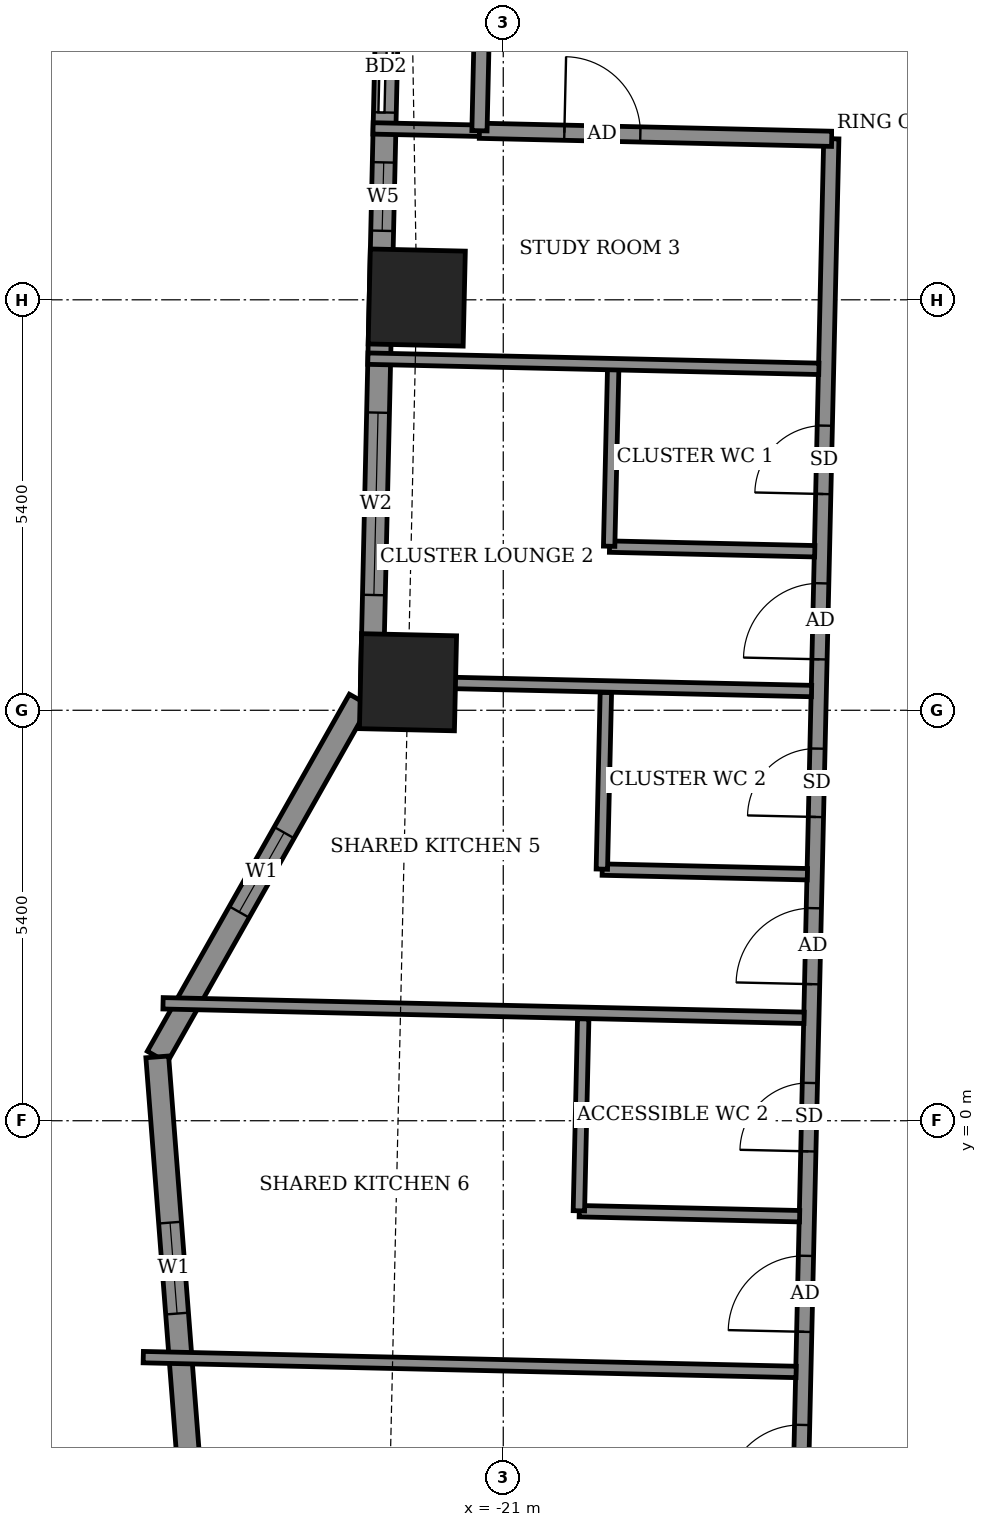
"""IFC4 building model, lengths in metres.
Left out: names, types, materials, properties, quantities, classifications, styles, units other than length and angle.
Written with IfcOpenShell. Run it as: python <this file> out.ifc"""

import sys

from ifc_helpers import new_model, si_unit, direction, frame, frame_2d, origin, origin_2d, place, context, subcontext, project, spatial, rectangle, extrude, element, fill, save


model = new_model("IFC4")
c1 = context("Model", 3, precision=1e-05, world=origin(), true_north=direction((0.0, 1.0)))
c2 = subcontext(c1, "Body", "Model", "MODEL_VIEW")
j1 = project(units=[si_unit("LENGTHUNIT", "METRE"), si_unit("PLANEANGLEUNIT", "RADIAN")], contexts=[c1])
p1 = place(None, origin())
s1 = spatial("IfcSite", under=j1, at=p1, CompositionType="ELEMENT")
p2 = place(p1, origin())
s2 = spatial("IfcBuilding", under=s1, at=p2, CompositionType="ELEMENT")
p3 = place(p2, frame((0.0, 0.0, 163.5)))
s3 = spatial("IfcBuildingStorey", under=s2, at=p3, CompositionType="ELEMENT", Elevation=163.5)
for number, where, z_axis, x_axis in (
    (1, (-22.138, 10.83, -0.55), (0.0, 0.0, 1.0), (-0.023, -1.0, 0.0)),
    (2, (-22.253, 5.769, -0.55), (0.0, 0.0, 1.0), (-0.023, -1.0, 0.0)),
):
    element("IfcColumn", number, at=place(p3, frame(where, z_axis=z_axis, x_axis=x_axis)), inside=s3, PredefinedType="COLUMN", context=c2, shape_type="SweptSolid", body=[
        extrude(rectangle(XDim=1.25, YDim=1.25, at=origin_2d()), origin(), (0.0, 0.0, 1.0), 3.6),
    ])
p4 = place(p3, frame((-22.501, 15.751, 0.0), z_axis=(0.0, 0.0, 1.0), x_axis=(-0.022737995473, -0.999741458359, 0.0)))
e3 = element("IfcWall", 3, at=p4, inside=s3, PredefinedType="SOLIDWALL", context=c2, shape_type="SweptSolid", body=[
    extrude(rectangle(XDim=10.029, YDim=0.3, at=frame_2d((5.014, 0.0))), origin(), (0.0, 0.0, 1.0), 3.05),
])
p5 = place(p4, frame((1.287, 0.0, 0.0)))
e4 = element("IfcOpeningElement", 4, at=p5, cuts=e3, PredefinedType="OPENING", context=c2, shape_type="SweptSolid", body=[
    extrude(rectangle(XDim=1.2, YDim=2.4, at=frame_2d((0.6, 1.2))), frame((0.0, 0.16, 0.0), z_axis=(0.0, -1.0, 0.0), x_axis=(1.0, 0.0, 0.0)), (0.0, 0.0, 1.0), 0.32),
])
p6 = place(p4, frame((3.144, 0.0, 0.9)))
e5 = element("IfcOpeningElement", 5, at=p6, cuts=e3, PredefinedType="OPENING", context=c2, shape_type="SweptSolid", body=[
    extrude(rectangle(XDim=0.9, YDim=1.5, at=frame_2d((0.45, 0.75))), frame((0.0, 0.16, 0.0), z_axis=(0.0, -1.0, 0.0), x_axis=(1.0, 0.0, 0.0)), (0.0, 0.0, 1.0), 0.32),
])
p7 = place(p4, frame((6.437, 0.0, 0.9)))
e6 = element("IfcOpeningElement", 6, at=p7, cuts=e3, PredefinedType="OPENING", context=c2, shape_type="SweptSolid", body=[
    extrude(rectangle(XDim=2.4, YDim=1.5, at=frame_2d((1.2, 0.75))), frame((0.0, 0.16, 0.0), z_axis=(0.0, -1.0, 0.0), x_axis=(1.0, 0.0, 0.0)), (0.0, 0.0, 1.0), 0.32),
])
p8 = place(p3, frame((-22.894, 5.537, 0.0), z_axis=(0.0, 0.0, 1.0), x_axis=(-0.492495436053, -0.870315026566, 0.0)))
e7 = element("IfcWall", 7, at=p8, inside=s3, PredefinedType="SOLIDWALL", context=c2, shape_type="SweptSolid", body=[
    extrude(rectangle(XDim=5.397, YDim=0.3, at=frame_2d((2.698, 0.0))), origin(), (0.0, 0.0, 1.0), 3.05),
])
p9 = place(p8, frame((2.007, 0.0, 0.9)))
e8 = element("IfcOpeningElement", 8, at=p9, cuts=e7, PredefinedType="OPENING", context=c2, shape_type="SweptSolid", body=[
    extrude(rectangle(XDim=1.2, YDim=1.5, at=frame_2d((0.6, 0.75))), frame((0.0, 0.16, 0.0), z_axis=(0.0, -1.0, 0.0), x_axis=(1.0, 0.0, 0.0)), (0.0, 0.0, 1.0), 0.32),
])
p10 = place(p3, frame((-25.552, 0.84, 0.0), z_axis=(0.0, 0.0, 1.0), x_axis=(0.076961115238, -0.997034095075, 0.0)))
e9 = element("IfcWall", 9, at=p10, inside=s3, PredefinedType="SOLIDWALL", context=c2, shape_type="SweptSolid", body=[
    extrude(rectangle(XDim=5.574, YDim=0.3, at=frame_2d((2.787, 0.0))), origin(), (0.0, 0.0, 1.0), 3.05),
])
p11 = place(p10, frame((2.187, 0.0, 0.9)))
e10 = element("IfcOpeningElement", 10, at=p11, cuts=e9, PredefinedType="OPENING", context=c2, shape_type="SweptSolid", body=[
    extrude(rectangle(XDim=1.2, YDim=1.5, at=frame_2d((0.6, 0.75))), frame((0.0, 0.16, 0.0), z_axis=(0.0, -1.0, 0.0), x_axis=(1.0, 0.0, 0.0)), (0.0, 0.0, 1.0), 0.32),
])
p12 = place(p3, frame((-17.32, -15.098, 0.0), z_axis=(0.0, 0.0, 1.0), x_axis=(0.022694293906, 0.999742451346, 0.0)))
e11 = element("IfcWall", 11, at=p12, inside=s3, PredefinedType="PARTITIONING", context=c2, shape_type="SweptSolid", body=[
    extrude(rectangle(XDim=28.024, YDim=0.2, at=frame_2d((14.012, 0.0))), origin(), (0.0, 0.0, 1.0), 3.05),
])
p13 = place(p12, frame((21.174, 0.0, 0.0)))
e12 = element("IfcOpeningElement", 12, at=p13, cuts=e11, PredefinedType="OPENING", context=c2, shape_type="SweptSolid", body=[
    extrude(rectangle(XDim=1.0, YDim=2.1, at=frame_2d((0.5, 1.05))), frame((0.0, 0.11, 0.0), z_axis=(0.0, -1.0, 0.0), x_axis=(1.0, 0.0, 0.0)), (0.0, 0.0, 1.0), 0.22),
])
p14 = place(p12, frame((23.349, 0.0, 0.0)))
e13 = element("IfcOpeningElement", 13, at=p14, cuts=e11, PredefinedType="OPENING", context=c2, shape_type="SweptSolid", body=[
    extrude(rectangle(XDim=0.9, YDim=2.1, at=frame_2d((0.45, 1.05))), frame((0.0, 0.11, 0.0), z_axis=(0.0, -1.0, 0.0), x_axis=(1.0, 0.0, 0.0)), (0.0, 0.0, 1.0), 0.22),
])
p15 = place(p12, frame((16.899, 0.0, 0.0)))
e14 = element("IfcOpeningElement", 14, at=p15, cuts=e11, PredefinedType="OPENING", context=c2, shape_type="SweptSolid", body=[
    extrude(rectangle(XDim=1.0, YDim=2.1, at=frame_2d((0.5, 1.05))), frame((0.0, 0.11, 0.0), z_axis=(0.0, -1.0, 0.0), x_axis=(1.0, 0.0, 0.0)), (0.0, 0.0, 1.0), 0.22),
])
p16 = place(p12, frame((19.099, 0.0, 0.0)))
e15 = element("IfcOpeningElement", 15, at=p16, cuts=e11, PredefinedType="OPENING", context=c2, shape_type="SweptSolid", body=[
    extrude(rectangle(XDim=0.9, YDim=2.1, at=frame_2d((0.45, 1.05))), frame((0.0, 0.11, 0.0), z_axis=(0.0, -1.0, 0.0), x_axis=(1.0, 0.0, 0.0)), (0.0, 0.0, 1.0), 0.22),
])
p17 = place(p12, frame((12.324, 0.0, 0.0)))
e16 = element("IfcOpeningElement", 16, at=p17, cuts=e11, PredefinedType="OPENING", context=c2, shape_type="SweptSolid", body=[
    extrude(rectangle(XDim=1.0, YDim=2.1, at=frame_2d((0.5, 1.05))), frame((0.0, 0.11, 0.0), z_axis=(0.0, -1.0, 0.0), x_axis=(1.0, 0.0, 0.0)), (0.0, 0.0, 1.0), 0.22),
])
p18 = place(p12, frame((14.699, 0.0, 0.0)))
e17 = element("IfcOpeningElement", 17, at=p18, cuts=e11, PredefinedType="OPENING", context=c2, shape_type="SweptSolid", body=[
    extrude(rectangle(XDim=0.9, YDim=2.1, at=frame_2d((0.45, 1.05))), frame((0.0, 0.11, 0.0), z_axis=(0.0, -1.0, 0.0), x_axis=(1.0, 0.0, 0.0)), (0.0, 0.0, 1.0), 0.22),
])
p19 = place(p12, frame((10.099, 0.0, 0.0)))
e18 = element("IfcOpeningElement", 18, at=p19, cuts=e11, PredefinedType="OPENING", context=c2, shape_type="SweptSolid", body=[
    extrude(rectangle(XDim=1.0, YDim=2.1, at=frame_2d((0.5, 1.05))), frame((0.0, 0.11, 0.0), z_axis=(0.0, -1.0, 0.0), x_axis=(1.0, 0.0, 0.0)), (0.0, 0.0, 1.0), 0.22),
])
p20 = place(p12, frame((7.749, 0.0, 0.0)))
e19 = element("IfcOpeningElement", 19, at=p20, cuts=e11, PredefinedType="OPENING", context=c2, shape_type="SweptSolid", body=[
    extrude(rectangle(XDim=0.9, YDim=2.1, at=frame_2d((0.45, 1.05))), frame((0.0, 0.11, 0.0), z_axis=(0.0, -1.0, 0.0), x_axis=(1.0, 0.0, 0.0)), (0.0, 0.0, 1.0), 0.22),
])
p21 = place(p12, frame((4.95, 0.0, 0.0)))
e20 = element("IfcOpeningElement", 20, at=p21, cuts=e11, PredefinedType="OPENING", context=c2, shape_type="SweptSolid", body=[
    extrude(rectangle(XDim=1.0, YDim=2.1, at=frame_2d((0.5, 1.05))), frame((0.0, 0.11, 0.0), z_axis=(0.0, -1.0, 0.0), x_axis=(1.0, 0.0, 0.0)), (0.0, 0.0, 1.0), 0.22),
])
p22 = place(p3, frame((-25.736, -3.11, 0.0), z_axis=(0.0, 0.0, 1.0), x_axis=(0.99974284683, -0.02267686512, 0.0)))
e21 = element("IfcWall", 21, at=p22, inside=s3, PredefinedType="PARTITIONING", context=c2, shape_type="SweptSolid", body=[
    extrude(rectangle(XDim=8.591, YDim=0.15, at=frame_2d((4.296, 0.0))), origin(), (0.0, 0.0, 1.0), 2.05),
])
p23 = place(p3, frame((-20.0, -1.19, 0.0), z_axis=(0.0, 0.0, 1.0), x_axis=(0.999739657619, -0.022817032779, 0.0)))
e22 = element("IfcWall", 22, at=p23, inside=s3, PredefinedType="PARTITIONING", context=c2, shape_type="SweptSolid", body=[
    extrude(rectangle(XDim=2.9, YDim=0.15, at=frame_2d((1.45, 0.0))), origin(), (0.0, 0.0, 1.0), 3.05),
])
p24 = place(p3, frame((-20.005, -1.185, 0.0), z_axis=(0.0, 0.0, 1.0), x_axis=(0.022521599255, 0.999746356616, 0.0)))
e23 = element("IfcWall", 23, at=p24, inside=s3, PredefinedType="PARTITIONING", context=c2, shape_type="SweptSolid", body=[
    extrude(rectangle(XDim=2.526, YDim=0.15, at=frame_2d((1.263, 0.0))), origin(), (0.0, 0.0, 1.0), 3.05),
])
p25 = place(p3, frame((-25.476, 1.545, 0.0), z_axis=(0.0, 0.0, 1.0), x_axis=(0.9997438932, -0.022630687329, 0.0)))
e24 = element("IfcWall", 24, at=p25, inside=s3, PredefinedType="PARTITIONING", context=c2, shape_type="SweptSolid", body=[
    extrude(rectangle(XDim=8.436, YDim=0.15, at=frame_2d((4.218, 0.0))), origin(), (0.0, 0.0, 1.0), 2.05),
])
p26 = place(p3, frame((-19.698, 3.304, 0.0), z_axis=(0.0, 0.0, 1.0), x_axis=(0.999744396973, -0.02260842146, 0.0)))
e25 = element("IfcWall", 25, at=p26, inside=s3, PredefinedType="PARTITIONING", context=c2, shape_type="SweptSolid", body=[
    extrude(rectangle(XDim=2.7, YDim=0.15, at=frame_2d((1.35, 0.0))), origin(), (0.0, 0.0, 1.0), 3.05),
])
p27 = place(p3, frame((-19.703, 3.31, 0.0), z_axis=(0.0, 0.0, 1.0), x_axis=(0.02279059109, 0.999740260747, 0.0)))
e26 = element("IfcWall", 26, at=p27, inside=s3, PredefinedType="PARTITIONING", context=c2, shape_type="SweptSolid", body=[
    extrude(rectangle(XDim=2.324, YDim=0.15, at=frame_2d((1.162, 0.0))), origin(), (0.0, 0.0, 1.0), 3.05),
])
p28 = place(p3, frame((-22.578, 5.78, 0.0), z_axis=(0.0, 0.0, 1.0), x_axis=(0.999746200787, -0.022528515532, 0.0)))
e27 = element("IfcWall", 27, at=p28, inside=s3, PredefinedType="PARTITIONING", context=c2, shape_type="SweptSolid", body=[
    extrude(rectangle(XDim=5.635, YDim=0.15, at=frame_2d((2.818, 0.0))), origin(), (0.0, 0.0, 1.0), 3.05),
])
p29 = place(p3, frame((-19.602, 7.553, 0.0), z_axis=(0.0, 0.0, 1.0), x_axis=(0.99974458177, -0.022600248254, 0.0)))
e28 = element("IfcWall", 28, at=p29, inside=s3, PredefinedType="PARTITIONING", context=c2, shape_type="SweptSolid", body=[
    extrude(rectangle(XDim=2.701, YDim=0.15, at=frame_2d((1.35, 0.0))), origin(), (0.0, 0.0, 1.0), 3.05),
])
p30 = place(p3, frame((-19.607, 7.558, 0.0), z_axis=(0.0, 0.0, 1.0), x_axis=(0.022781023197, 0.999740478815, 0.0)))
e29 = element("IfcWall", 29, at=p30, inside=s3, PredefinedType="PARTITIONING", context=c2, shape_type="SweptSolid", body=[
    extrude(rectangle(XDim=2.325, YDim=0.15, at=frame_2d((1.163, 0.0))), origin(), (0.0, 0.0, 1.0), 3.05),
])
p31 = place(p3, frame((-22.781, 10.026, 0.0), z_axis=(0.0, 0.0, 1.0), x_axis=(0.999745855039, -0.022543853533, 0.0)))
e30 = element("IfcWall", 30, at=p31, inside=s3, PredefinedType="PARTITIONING", context=c2, shape_type="SweptSolid", body=[
    extrude(rectangle(XDim=5.935, YDim=0.15, at=frame_2d((2.967, 0.0))), origin(), (0.0, 0.0, 1.0), 2.55),
])
p32 = place(p3, frame((-22.713, 13.055, 0.0), z_axis=(0.0, 0.0, 1.0), x_axis=(0.999756172383, -0.022081571112, 0.0)))
e31 = element("IfcWall", 31, at=p32, inside=s3, PredefinedType="PARTITIONING", context=c2, shape_type="SweptSolid", body=[
    extrude(rectangle(XDim=1.404, YDim=0.15, at=frame_2d((0.702, 0.0))), origin(), (0.0, 0.0, 1.0), 2.55),
])
p33 = place(p3, frame((-21.313, 13.024, 0.0), z_axis=(0.0, 0.0, 1.0), x_axis=(0.999738699021, -0.022858995594, 0.0)))
e32 = element("IfcWall", 32, at=p33, inside=s3, PredefinedType="PARTITIONING", context=c2, shape_type="SweptSolid", body=[
    extrude(rectangle(XDim=4.635, YDim=0.2, at=frame_2d((2.318, 0.0))), origin(), (0.0, 0.0, 1.0), 3.05),
])
p34 = place(p33, frame((1.117, 0.0, 0.0)))
e33 = element("IfcOpeningElement", 33, at=p34, cuts=e32, PredefinedType="OPENING", context=c2, shape_type="SweptSolid", body=[
    extrude(rectangle(XDim=1.0, YDim=2.1, at=frame_2d((0.5, 1.05))), frame((0.0, 0.11, 0.0), z_axis=(0.0, -1.0, 0.0), x_axis=(1.0, 0.0, 0.0)), (0.0, 0.0, 1.0), 0.22),
])
p35 = place(p3, frame((-21.313, 13.024, 0.0), z_axis=(0.0, 0.0, 1.0), x_axis=(0.022632637625, 0.99974384905, 0.0)))
e34 = element("IfcWall", 34, at=p35, inside=s3, PredefinedType="PARTITIONING", context=c2, shape_type="SweptSolid", body=[
    extrude(rectangle(XDim=1.5, YDim=0.2, at=frame_2d((0.75, 0.0))), origin(), (0.0, 0.0, 1.0), 3.05),
])
p36 = place(p3, frame((-21.279, 14.523, 0.0), z_axis=(0.0, 0.0, 1.0), x_axis=(0.999742669174, -0.02268469602, 0.0)))
e35 = element("IfcWall", 35, at=p36, inside=s3, PredefinedType="PARTITIONING", context=c2, shape_type="SweptSolid", body=[
    extrude(rectangle(XDim=40.639, YDim=0.2, at=frame_2d((20.319, 0.0))), origin(), (0.0, 0.0, 1.0), 3.05),
])
p37 = place(p36, frame((38.275, 0.0, 0.0)))
e36 = element("IfcOpeningElement", 36, at=p37, cuts=e35, PredefinedType="OPENING", context=c2, shape_type="SweptSolid", body=[
    extrude(rectangle(XDim=0.9, YDim=2.1, at=frame_2d((0.45, 1.05))), frame((0.0, 0.11, 0.0), z_axis=(0.0, -1.0, 0.0), x_axis=(1.0, 0.0, 0.0)), (0.0, 0.0, 1.0), 0.22),
])
p38 = place(p36, frame((31.475, 0.0, 0.0)))
e37 = element("IfcOpeningElement", 37, at=p38, cuts=e35, PredefinedType="OPENING", context=c2, shape_type="SweptSolid", body=[
    extrude(rectangle(XDim=0.9, YDim=2.1, at=frame_2d((0.45, 1.05))), frame((0.0, 0.11, 0.0), z_axis=(0.0, -1.0, 0.0), x_axis=(1.0, 0.0, 0.0)), (0.0, 0.0, 1.0), 0.22),
])
p39 = place(p36, frame((29.35, 0.0, 0.0)))
e38 = element("IfcOpeningElement", 38, at=p39, cuts=e35, PredefinedType="OPENING", context=c2, shape_type="SweptSolid", body=[
    extrude(rectangle(XDim=0.9, YDim=2.1, at=frame_2d((0.45, 1.05))), frame((0.0, 0.11, 0.0), z_axis=(0.0, -1.0, 0.0), x_axis=(1.0, 0.0, 0.0)), (0.0, 0.0, 1.0), 0.22),
])
p40 = place(p36, frame((22.45, 0.0, 0.0)))
e39 = element("IfcOpeningElement", 39, at=p40, cuts=e35, PredefinedType="OPENING", context=c2, shape_type="SweptSolid", body=[
    extrude(rectangle(XDim=0.9, YDim=2.1, at=frame_2d((0.45, 1.05))), frame((0.0, 0.11, 0.0), z_axis=(0.0, -1.0, 0.0), x_axis=(1.0, 0.0, 0.0)), (0.0, 0.0, 1.0), 0.22),
])
p41 = place(p36, frame((20.425, 0.0, 0.0)))
e40 = element("IfcOpeningElement", 40, at=p41, cuts=e35, PredefinedType="OPENING", context=c2, shape_type="SweptSolid", body=[
    extrude(rectangle(XDim=0.9, YDim=2.1, at=frame_2d((0.45, 1.05))), frame((0.0, 0.11, 0.0), z_axis=(0.0, -1.0, 0.0), x_axis=(1.0, 0.0, 0.0)), (0.0, 0.0, 1.0), 0.22),
])
p42 = place(p36, frame((13.575, 0.0, 0.0)))
e41 = element("IfcOpeningElement", 41, at=p42, cuts=e35, PredefinedType="OPENING", context=c2, shape_type="SweptSolid", body=[
    extrude(rectangle(XDim=0.9, YDim=2.1, at=frame_2d((0.45, 1.05))), frame((0.0, 0.11, 0.0), z_axis=(0.0, -1.0, 0.0), x_axis=(1.0, 0.0, 0.0)), (0.0, 0.0, 1.0), 0.22),
])
p43 = place(p36, frame((11.4, 0.0, 0.0)))
e42 = element("IfcOpeningElement", 42, at=p43, cuts=e35, PredefinedType="OPENING", context=c2, shape_type="SweptSolid", body=[
    extrude(rectangle(XDim=0.9, YDim=2.1, at=frame_2d((0.45, 1.05))), frame((0.0, 0.11, 0.0), z_axis=(0.0, -1.0, 0.0), x_axis=(1.0, 0.0, 0.0)), (0.0, 0.0, 1.0), 0.22),
])
p44 = place(p36, frame((1.575, 0.0, 0.0)))
e43 = element("IfcOpeningElement", 43, at=p44, cuts=e35, PredefinedType="OPENING", context=c2, shape_type="SweptSolid", body=[
    extrude(rectangle(XDim=1.0, YDim=2.1, at=frame_2d((0.5, 1.05))), frame((0.0, 0.11, 0.0), z_axis=(0.0, -1.0, 0.0), x_axis=(1.0, 0.0, 0.0)), (0.0, 0.0, 1.0), 0.22),
])
p45 = place(p36, frame((6.6, 0.0, 0.0)))
e44 = element("IfcOpeningElement", 44, at=p45, cuts=e35, PredefinedType="OPENING", context=c2, shape_type="SweptSolid", body=[
    extrude(rectangle(XDim=0.9, YDim=2.1, at=frame_2d((0.45, 1.05))), frame((0.0, 0.11, 0.0), z_axis=(0.0, -1.0, 0.0), x_axis=(1.0, 0.0, 0.0)), (0.0, 0.0, 1.0), 0.22),
])
p46 = place(p5, origin())
e45 = element("IfcDoor", 45, at=p46, inside=s3, OperationType="SLIDING_TO_LEFT", PredefinedType="DOOR", context=c2, shape_type="SweptSolid", body=[
    extrude(rectangle(XDim=1.2, YDim=2.4, at=frame_2d((0.6, 1.2))), frame((0.0, 0.025, 0.0), z_axis=(0.0, -1.0, 0.0), x_axis=(1.0, 0.0, 0.0)), (0.0, 0.0, 1.0), 0.05),
])
fill(e4, e45)
p47 = place(p6, origin())
e46 = element("IfcWindow", 46, at=p47, inside=s3, PartitioningType="SINGLE_PANEL", PredefinedType="WINDOW", context=c2, shape_type="SweptSolid", body=[
    extrude(rectangle(XDim=0.9, YDim=1.5, at=frame_2d((0.45, 0.75))), frame((0.0, 0.03, 0.0), z_axis=(0.0, -1.0, 0.0), x_axis=(1.0, 0.0, 0.0)), (0.0, 0.0, 1.0), 0.06),
])
fill(e5, e46)
p48 = place(p7, origin())
e47 = element("IfcWindow", 47, at=p48, inside=s3, PartitioningType="DOUBLE_PANEL_VERTICAL", PredefinedType="WINDOW", context=c2, shape_type="SweptSolid", body=[
    extrude(rectangle(XDim=2.4, YDim=1.5, at=frame_2d((1.2, 0.75))), frame((0.0, 0.03, 0.0), z_axis=(0.0, -1.0, 0.0), x_axis=(1.0, 0.0, 0.0)), (0.0, 0.0, 1.0), 0.06),
])
fill(e6, e47)
p49 = place(p9, origin())
e48 = element("IfcWindow", 48, at=p49, inside=s3, PartitioningType="SINGLE_PANEL", PredefinedType="WINDOW", context=c2, shape_type="SweptSolid", body=[
    extrude(rectangle(XDim=1.2, YDim=1.5, at=frame_2d((0.6, 0.75))), frame((0.0, 0.03, 0.0), z_axis=(0.0, -1.0, 0.0), x_axis=(1.0, 0.0, 0.0)), (0.0, 0.0, 1.0), 0.06),
])
fill(e8, e48)
p50 = place(p11, origin())
e49 = element("IfcWindow", 49, at=p50, inside=s3, PartitioningType="SINGLE_PANEL", PredefinedType="WINDOW", context=c2, shape_type="SweptSolid", body=[
    extrude(rectangle(XDim=1.2, YDim=1.5, at=frame_2d((0.6, 0.75))), frame((0.0, 0.03, 0.0), z_axis=(0.0, -1.0, 0.0), x_axis=(1.0, 0.0, 0.0)), (0.0, 0.0, 1.0), 0.06),
])
fill(e10, e49)
p51 = place(p34, origin())
e50 = element("IfcDoor", 50, at=p51, inside=s3, OperationType="SINGLE_SWING_RIGHT", PredefinedType="DOOR", context=c2, shape_type="SweptSolid", body=[
    extrude(rectangle(XDim=1.0, YDim=2.1, at=frame_2d((0.5, 1.05))), frame((0.0, 0.025, 0.0), z_axis=(0.0, -1.0, 0.0), x_axis=(1.0, 0.0, 0.0)), (0.0, 0.0, 1.0), 0.05),
])
fill(e33, e50)
p52 = place(p13, origin())
e51 = element("IfcDoor", 51, at=p52, inside=s3, OperationType="SINGLE_SWING_LEFT", PredefinedType="DOOR", context=c2, shape_type="SweptSolid", body=[
    extrude(rectangle(XDim=1.0, YDim=2.1, at=frame_2d((0.5, 1.05))), frame((0.0, 0.025, 0.0), z_axis=(0.0, -1.0, 0.0), x_axis=(1.0, 0.0, 0.0)), (0.0, 0.0, 1.0), 0.05),
])
fill(e12, e51)
p53 = place(p14, origin())
e52 = element("IfcDoor", 52, at=p53, inside=s3, OperationType="SINGLE_SWING_RIGHT", PredefinedType="DOOR", context=c2, shape_type="SweptSolid", body=[
    extrude(rectangle(XDim=0.9, YDim=2.1, at=frame_2d((0.45, 1.05))), frame((0.0, 0.025, 0.0), z_axis=(0.0, -1.0, 0.0), x_axis=(1.0, 0.0, 0.0)), (0.0, 0.0, 1.0), 0.05),
])
fill(e13, e52)
p54 = place(p15, origin())
e53 = element("IfcDoor", 53, at=p54, inside=s3, OperationType="SINGLE_SWING_RIGHT", PredefinedType="DOOR", context=c2, shape_type="SweptSolid", body=[
    extrude(rectangle(XDim=1.0, YDim=2.1, at=frame_2d((0.5, 1.05))), frame((0.0, 0.025, 0.0), z_axis=(0.0, -1.0, 0.0), x_axis=(1.0, 0.0, 0.0)), (0.0, 0.0, 1.0), 0.05),
])
fill(e14, e53)
p55 = place(p16, origin())
e54 = element("IfcDoor", 54, at=p55, inside=s3, OperationType="SINGLE_SWING_LEFT", PredefinedType="DOOR", context=c2, shape_type="SweptSolid", body=[
    extrude(rectangle(XDim=0.9, YDim=2.1, at=frame_2d((0.45, 1.05))), frame((0.0, 0.025, 0.0), z_axis=(0.0, -1.0, 0.0), x_axis=(1.0, 0.0, 0.0)), (0.0, 0.0, 1.0), 0.05),
])
fill(e15, e54)
p56 = place(p17, origin())
e55 = element("IfcDoor", 55, at=p56, inside=s3, OperationType="SINGLE_SWING_LEFT", PredefinedType="DOOR", context=c2, shape_type="SweptSolid", body=[
    extrude(rectangle(XDim=1.0, YDim=2.1, at=frame_2d((0.5, 1.05))), frame((0.0, 0.025, 0.0), z_axis=(0.0, -1.0, 0.0), x_axis=(1.0, 0.0, 0.0)), (0.0, 0.0, 1.0), 0.05),
])
fill(e16, e55)
p57 = place(p18, origin())
e56 = element("IfcDoor", 56, at=p57, inside=s3, OperationType="SINGLE_SWING_RIGHT", PredefinedType="DOOR", context=c2, shape_type="SweptSolid", body=[
    extrude(rectangle(XDim=0.9, YDim=2.1, at=frame_2d((0.45, 1.05))), frame((0.0, 0.025, 0.0), z_axis=(0.0, -1.0, 0.0), x_axis=(1.0, 0.0, 0.0)), (0.0, 0.0, 1.0), 0.05),
])
fill(e17, e56)
p58 = place(p19, origin())
e57 = element("IfcDoor", 57, at=p58, inside=s3, OperationType="SINGLE_SWING_RIGHT", PredefinedType="DOOR", context=c2, shape_type="SweptSolid", body=[
    extrude(rectangle(XDim=1.0, YDim=2.1, at=frame_2d((0.5, 1.05))), frame((0.0, 0.025, 0.0), z_axis=(0.0, -1.0, 0.0), x_axis=(1.0, 0.0, 0.0)), (0.0, 0.0, 1.0), 0.05),
])
fill(e18, e57)
save(model, sys.argv[1])
